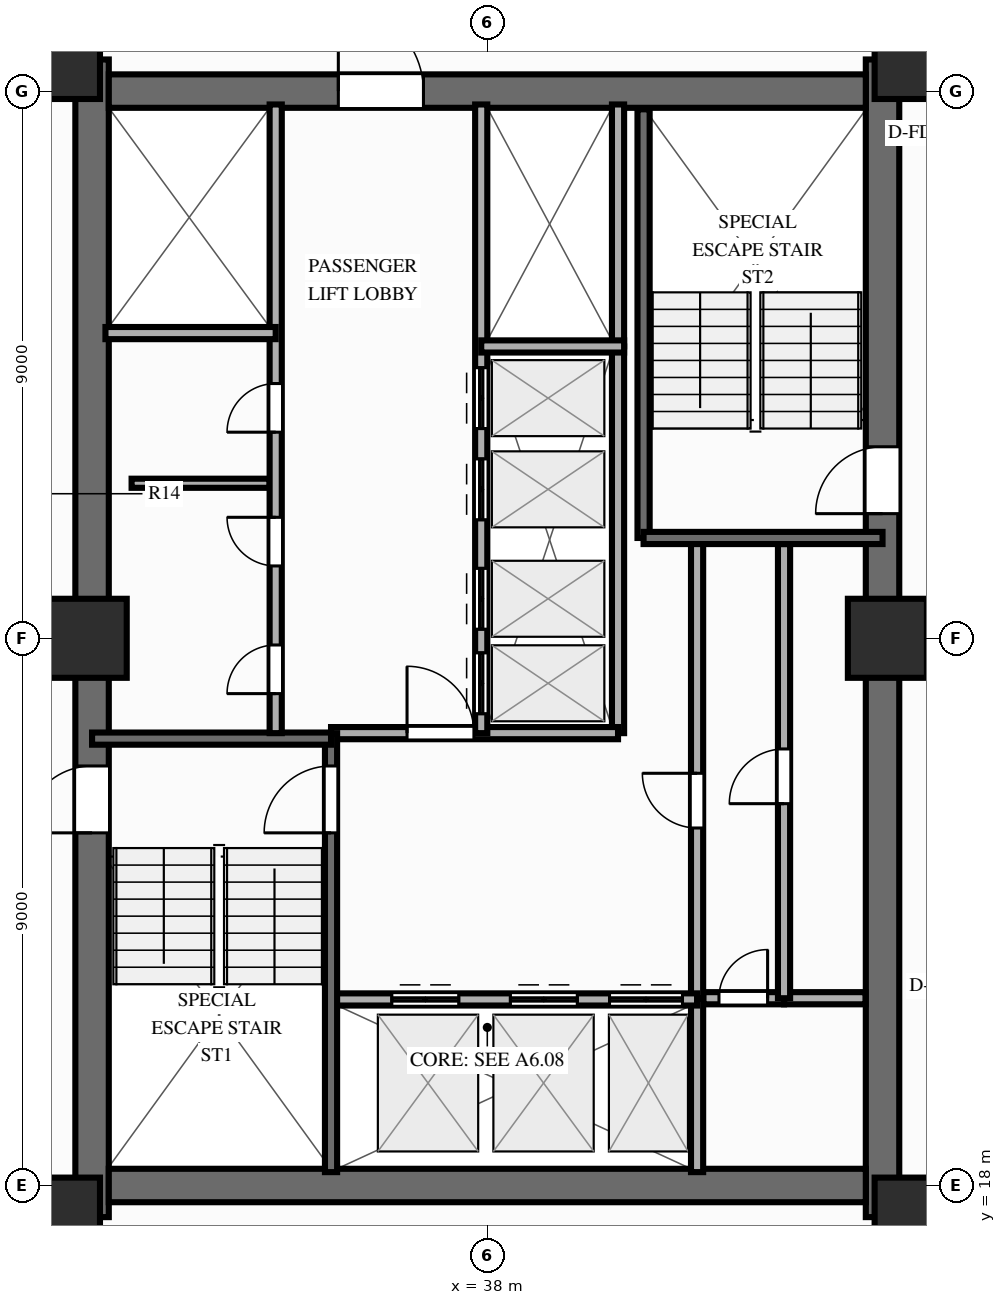
"""IFC4 building model, lengths in metres.
Left out: names, types, materials, properties, quantities, classifications, styles, units other than length and angle.
Written with IfcOpenShell. Run it as: python <this file> out.ifc"""

import sys

from ifc_helpers import new_model, si_unit, direction, frame, frame_2d, origin, origin_2d, place, context, subcontext, project, spatial, rectangle, extrude, source, transform, mapped, element, fill, save


model = new_model("IFC4")
c1 = context("Model", 3, precision=1e-05, world=origin(), true_north=direction((0.0, 1.0)))
c2 = subcontext(c1, "Body", "Model", "MODEL_VIEW")
j1 = project(units=[si_unit("LENGTHUNIT", "METRE"), si_unit("PLANEANGLEUNIT", "RADIAN")], contexts=[c1])
p1 = place(None, origin())
s1 = spatial("IfcSite", under=j1, at=p1, CompositionType="ELEMENT")
p2 = place(p1, origin())
s2 = spatial("IfcBuilding", under=s1, at=p2, CompositionType="ELEMENT")
p3 = place(p2, frame((0.0, 0.0, 126.75)))
s3 = spatial("IfcBuildingStorey", under=s2, at=p3, CompositionType="ELEMENT", Elevation=126.75)
p4 = place(p3, frame((31.5, 17.48, 0.0), z_axis=(0.0, 0.0, 1.0), x_axis=(0.0, 1.0, 0.0)))
e1 = element("IfcWall", 1, at=p4, inside=s3, PredefinedType="SHEAR", context=c2, shape_type="SweptSolid", body=[
    extrude(rectangle(XDim=19.04, YDim=0.55, at=frame_2d((9.52, 0.0))), origin(), (0.0, 0.0, 1.0), 3.0),
])
p5 = place(p4, frame((6.32, 0.0, 0.0)))
e2 = element("IfcOpeningElement", 2, at=p5, cuts=e1, PredefinedType="OPENING", context=c2, shape_type="SweptSolid", body=[
    extrude(rectangle(XDim=1.1, YDim=2.15, at=frame_2d((0.55, 1.075))), frame((0.0, 0.287, 0.0), z_axis=(0.0, -1.0, 0.0), x_axis=(1.0, 0.0, 0.0)), (0.0, 0.0, 1.0), 0.574),
])
p6 = place(p3, frame((44.5, 17.48, 0.0), z_axis=(0.0, 0.0, 1.0), x_axis=(0.0, 1.0, 0.0)))
e3 = element("IfcWall", 3, at=p6, inside=s3, PredefinedType="SHEAR", context=c2, shape_type="SweptSolid", body=[
    extrude(rectangle(XDim=19.04, YDim=0.55, at=frame_2d((9.52, 0.0))), origin(), (0.0, 0.0, 1.0), 3.0),
])
p7 = place(p6, frame((12.67, 0.0, 0.0), z_axis=(0.0, 0.0, 1.0), x_axis=(-1.0, 0.0, 0.0)))
e4 = element("IfcOpeningElement", 4, at=p7, cuts=e3, PredefinedType="OPENING", context=c2, shape_type="SweptSolid", body=[
    extrude(rectangle(XDim=1.1, YDim=2.15, at=frame_2d((0.55, 1.075))), frame((0.0, 0.287, 0.0), z_axis=(0.0, -1.0, 0.0), x_axis=(1.0, 0.0, 0.0)), (0.0, 0.0, 1.0), 0.574),
])
p8 = place(p3, frame((31.775, 18.0, 0.0), z_axis=(0.0, 0.0, 1.0), x_axis=(1.0, 0.0, 0.0)))
e5 = element("IfcWall", 5, at=p8, inside=s3, PredefinedType="SHEAR", context=c2, shape_type="SweptSolid", body=[
    extrude(rectangle(XDim=12.45, YDim=0.55, at=frame_2d((6.225, 0.0))), origin(), (0.0, 0.0, 1.0), 3.0),
])
p9 = place(p3, frame((31.775, 36.0, 0.0), z_axis=(0.0, 0.0, 1.0), x_axis=(1.0, 0.0, 0.0)))
e6 = element("IfcWall", 6, at=p9, inside=s3, PredefinedType="SHEAR", context=c2, shape_type="SweptSolid", body=[
    extrude(rectangle(XDim=12.45, YDim=0.55, at=frame_2d((6.225, 0.0))), origin(), (0.0, 0.0, 1.0), 3.0),
])
p10 = place(p9, frame((5.175, 0.0, 0.0), z_axis=(0.0, 0.0, 1.0), x_axis=(-1.0, 0.0, 0.0)))
e7 = element("IfcOpeningElement", 7, at=p10, cuts=e6, PredefinedType="OPENING", context=c2, shape_type="SweptSolid", body=[
    extrude(rectangle(XDim=1.4, YDim=2.15, at=frame_2d((0.7, 1.075))), frame((0.0, 0.287, 0.0), z_axis=(0.0, -1.0, 0.0), x_axis=(1.0, 0.0, 0.0)), (0.0, 0.0, 1.0), 0.574),
])
m1 = source(origin(), c2, "Body", "SweptSolid", [
    extrude(rectangle(XDim=1.3, YDim=1.3, at=origin_2d()), origin(), (0.0, 0.0, 1.0), 3.0),
])
for number, where, z_axis, x_axis in (
    (8, (30.98, 17.48, 0.0), (0.0, 0.0, 1.0), (1.0, 0.0, 0.0)),
    (9, (45.02, 17.48, 0.0), (0.0, 0.0, 1.0), (1.0, 0.0, 0.0)),
    (10, (30.98, 36.52, 0.0), (0.0, 0.0, 1.0), (1.0, 0.0, 0.0)),
    (11, (45.02, 36.52, 0.0), (0.0, 0.0, 1.0), (1.0, 0.0, 0.0)),
    (12, (31.42, 27.0, 0.0), (0.0, 0.0, 1.0), (1.0, 0.0, 0.0)),
    (13, (44.58, 27.0, 0.0), (0.0, 0.0, 1.0), (1.0, 0.0, 0.0)),
):
    element("IfcColumn", number, at=place(p3, frame(where, z_axis=z_axis, x_axis=x_axis)), inside=s3, PredefinedType="COLUMN", context=c2, shape_type="MappedRepresentation", body=[
        mapped(m1, transform((0.0, 0.0, 0.0), scale=1.0)),
    ])
p11 = place(p3, frame((32.15, 29.55, 0.0), z_axis=(0.0, 0.0, 1.0), x_axis=(1.0, 0.0, 0.0)))
e14 = element("IfcWall", 14, at=p11, inside=s3, PredefinedType="PARTITIONING", context=c2, shape_type="SweptSolid", body=[
    extrude(rectangle(XDim=2.27, YDim=0.15, at=frame_2d((1.135, 0.0))), origin(), (0.0, 0.0, 1.0), 2.79),
])
p12 = place(p3, frame((41.55, 21.08, 0.0), z_axis=(0.0, 0.0, 1.0), x_axis=(1.0, 0.0, 0.0)))
e15 = element("IfcWall", 15, at=p12, inside=s3, PredefinedType="PARTITIONING", context=c2, shape_type="SweptSolid", body=[
    extrude(rectangle(XDim=1.33, YDim=0.2, at=frame_2d((0.665, 0.0))), origin(), (0.0, 0.0, 1.0), 2.79),
])
p13 = place(p12, frame((0.26, 0.0, 0.0)))
e16 = element("IfcOpeningElement", 16, at=p13, cuts=e15, PredefinedType="OPENING", context=c2, shape_type="SweptSolid", body=[
    extrude(rectangle(XDim=0.8, YDim=2.05, at=frame_2d((0.4, 1.025))), frame((0.0, 0.112, 0.0), z_axis=(0.0, -1.0, 0.0), x_axis=(1.0, 0.0, 0.0)), (0.0, 0.0, 1.0), 0.224),
])
p14 = place(p3, frame((42.88, 21.08, 0.0), z_axis=(0.0, 0.0, 1.0), x_axis=(1.0, 0.0, 0.0)))
e17 = element("IfcWall", 17, at=p14, inside=s3, PredefinedType="PARTITIONING", context=c2, shape_type="SweptSolid", body=[
    extrude(rectangle(XDim=1.34, YDim=0.2, at=frame_2d((0.67, 0.0))), origin(), (0.0, 0.0, 1.0), 2.79),
])
p15 = place(p3, frame((42.88, 21.08, 0.0), z_axis=(0.0, 0.0, 1.0), x_axis=(0.0, 1.0, 0.0)))
e18 = element("IfcWall", 18, at=p15, inside=s3, PredefinedType="PARTITIONING", context=c2, shape_type="SweptSolid", body=[
    extrude(rectangle(XDim=7.47, YDim=0.2, at=frame_2d((3.735, 0.0))), origin(), (0.0, 0.0, 1.0), 2.79),
])
p16 = place(p15, frame((3.2, 0.0, 0.0)))
e19 = element("IfcOpeningElement", 19, at=p16, cuts=e18, PredefinedType="OPENING", context=c2, shape_type="SweptSolid", body=[
    extrude(rectangle(XDim=0.9, YDim=2.1, at=frame_2d((0.45, 1.05))), frame((0.0, 0.112, 0.0), z_axis=(0.0, -1.0, 0.0), x_axis=(1.0, 0.0, 0.0)), (0.0, 0.0, 1.0), 0.224),
])
p17 = place(p3, frame((41.45, 18.22, 0.0), z_axis=(0.0, 0.0, 1.0), x_axis=(0.0, 1.0, 0.0)))
e20 = element("IfcWall", 20, at=p17, inside=s3, PredefinedType="PARTITIONING", context=c2, shape_type="SweptSolid", body=[
    extrude(rectangle(XDim=2.86, YDim=0.2, at=frame_2d((1.43, 0.0))), origin(), (0.0, 0.0, 1.0), 2.79),
])
p18 = place(p3, frame((41.45, 21.08, 0.0), z_axis=(0.0, 0.0, 1.0), x_axis=(0.0, 1.0, 0.0)))
e21 = element("IfcWall", 21, at=p18, inside=s3, PredefinedType="PARTITIONING", context=c2, shape_type="SweptSolid", body=[
    extrude(rectangle(XDim=7.52, YDim=0.2, at=frame_2d((3.76, 0.0))), origin(), (0.0, 0.0, 1.0), 2.79),
])
p19 = place(p18, frame((2.8, 0.0, 0.0)))
e22 = element("IfcOpeningElement", 22, at=p19, cuts=e21, PredefinedType="OPENING", context=c2, shape_type="SweptSolid", body=[
    extrude(rectangle(XDim=0.9, YDim=2.1, at=frame_2d((0.45, 1.05))), frame((0.0, 0.112, 0.0), z_axis=(0.0, -1.0, 0.0), x_axis=(1.0, 0.0, 0.0)), (0.0, 0.0, 1.0), 0.224),
])
p20 = place(p3, frame((40.15, 25.44, 0.0), z_axis=(0.0, 0.0, 1.0), x_axis=(0.0, 1.0, 0.0)))
e23 = element("IfcWall", 23, at=p20, inside=s3, PredefinedType="PARTITIONING", context=c2, shape_type="SweptSolid", body=[
    extrude(rectangle(XDim=6.36, YDim=0.2, at=frame_2d((3.18, 0.0))), origin(), (0.0, 0.0, 1.0), 2.79),
])
p21 = place(p3, frame((40.15, 31.8, 0.0), z_axis=(0.0, 0.0, 1.0), x_axis=(0.0, 1.0, 0.0)))
e24 = element("IfcWall", 24, at=p21, inside=s3, PredefinedType="PARTITIONING", context=c2, shape_type="SweptSolid", body=[
    extrude(rectangle(XDim=3.98, YDim=0.2, at=frame_2d((1.99, 0.0))), origin(), (0.0, 0.0, 1.0), 2.79),
])
p22 = place(p3, frame((35.43, 21.06, 0.0), z_axis=(0.0, 0.0, 1.0), x_axis=(1.0, 0.0, 0.0)))
e25 = element("IfcWall", 25, at=p22, inside=s3, PredefinedType="PARTITIONING", context=c2, shape_type="SweptSolid", body=[
    extrude(rectangle(XDim=6.02, YDim=0.2, at=frame_2d((3.01, 0.0))), origin(), (0.0, 0.0, 1.0), 2.79),
])
p23 = place(p22, frame((1.0, 0.0, 0.0)))
e26 = element("IfcOpeningElement", 26, at=p23, cuts=e25, PredefinedType="OPENING", context=c2, shape_type="SweptSolid", body=[
    extrude(rectangle(XDim=1.1, YDim=2.15, at=frame_2d((0.55, 1.075))), frame((0.0, 0.112, 0.0), z_axis=(0.0, -1.0, 0.0), x_axis=(1.0, 0.0, 0.0)), (0.0, 0.0, 1.0), 0.224),
])
p24 = place(p22, frame((2.95, 0.0, 0.0)))
e27 = element("IfcOpeningElement", 27, at=p24, cuts=e25, PredefinedType="OPENING", context=c2, shape_type="SweptSolid", body=[
    extrude(rectangle(XDim=1.1, YDim=2.15, at=frame_2d((0.55, 1.075))), frame((0.0, 0.112, 0.0), z_axis=(0.0, -1.0, 0.0), x_axis=(1.0, 0.0, 0.0)), (0.0, 0.0, 1.0), 0.224),
])
p25 = place(p22, frame((4.58, 0.0, 0.0)))
e28 = element("IfcOpeningElement", 28, at=p25, cuts=e25, PredefinedType="OPENING", context=c2, shape_type="SweptSolid", body=[
    extrude(rectangle(XDim=1.2, YDim=2.15, at=frame_2d((0.6, 1.075))), frame((0.0, 0.112, 0.0), z_axis=(0.0, -1.0, 0.0), x_axis=(1.0, 0.0, 0.0)), (0.0, 0.0, 1.0), 0.224),
])
p26 = place(p3, frame((35.43, 25.44, 0.0), z_axis=(0.0, 0.0, 1.0), x_axis=(1.0, 0.0, 0.0)))
e29 = element("IfcWall", 29, at=p26, inside=s3, PredefinedType="PARTITIONING", context=c2, shape_type="SweptSolid", body=[
    extrude(rectangle(XDim=4.72, YDim=0.2, at=frame_2d((2.36, 0.0))), origin(), (0.0, 0.0, 1.0), 2.79),
])
p27 = place(p26, frame((1.25, 0.0, 0.0)))
e30 = element("IfcOpeningElement", 30, at=p27, cuts=e29, PredefinedType="OPENING", context=c2, shape_type="SweptSolid", body=[
    extrude(rectangle(XDim=1.1, YDim=2.15, at=frame_2d((0.55, 1.075))), frame((0.0, 0.112, 0.0), z_axis=(0.0, -1.0, 0.0), x_axis=(1.0, 0.0, 0.0)), (0.0, 0.0, 1.0), 0.224),
])
p28 = place(p3, frame((35.43, 18.22, 0.0), z_axis=(0.0, 0.0, 1.0), x_axis=(0.0, 1.0, 0.0)))
e31 = element("IfcWall", 31, at=p28, inside=s3, PredefinedType="SOLIDWALL", context=c2, shape_type="SweptSolid", body=[
    extrude(rectangle(XDim=7.22, YDim=0.2, at=frame_2d((3.61, 0.0))), origin(), (0.0, 0.0, 1.0), 2.79),
])
p29 = place(p28, frame((6.68, 0.0, 0.0), z_axis=(0.0, 0.0, 1.0), x_axis=(-1.0, 0.0, 0.0)))
e32 = element("IfcOpeningElement", 32, at=p29, cuts=e31, PredefinedType="OPENING", context=c2, shape_type="SweptSolid", body=[
    extrude(rectangle(XDim=1.1, YDim=2.15, at=frame_2d((0.55, 1.075))), frame((0.0, 0.112, 0.0), z_axis=(0.0, -1.0, 0.0), x_axis=(1.0, 0.0, 0.0)), (0.0, 0.0, 1.0), 0.224),
])
p30 = place(p3, frame((31.5, 25.35, 0.0), z_axis=(0.0, 0.0, 1.0), x_axis=(1.0, 0.0, 0.0)))
e33 = element("IfcWall", 33, at=p30, inside=s3, PredefinedType="SOLIDWALL", context=c2, shape_type="SweptSolid", body=[
    extrude(rectangle(XDim=3.93, YDim=0.2, at=frame_2d((1.965, 0.0))), origin(), (0.0, 0.0, 1.0), 2.79),
])
p31 = place(p3, frame((40.57, 28.65, 0.0), z_axis=(0.0, 0.0, 1.0), x_axis=(0.0, 1.0, 0.0)))
e34 = element("IfcWall", 34, at=p31, inside=s3, PredefinedType="SOLIDWALL", context=c2, shape_type="SweptSolid", body=[
    extrude(rectangle(XDim=7.05, YDim=0.2, at=frame_2d((3.525, 0.0))), origin(), (0.0, 0.0, 1.0), 2.79),
])
p32 = place(p3, frame((40.57, 28.65, 0.0), z_axis=(0.0, 0.0, 1.0), x_axis=(1.0, 0.0, 0.0)))
e35 = element("IfcWall", 35, at=p32, inside=s3, PredefinedType="SOLIDWALL", context=c2, shape_type="SweptSolid", body=[
    extrude(rectangle(XDim=3.93, YDim=0.2, at=frame_2d((1.965, 0.0))), origin(), (0.0, 0.0, 1.0), 2.79),
])
p33 = place(p3, frame((34.52, 25.44, 0.0), z_axis=(0.0, 0.0, 1.0), x_axis=(0.0, 1.0, 0.0)))
e36 = element("IfcWall", 36, at=p33, inside=s3, PredefinedType="PARTITIONING", context=c2, shape_type="SweptSolid", body=[
    extrude(rectangle(XDim=10.34, YDim=0.2, at=frame_2d((5.17, 0.0))), origin(), (0.0, 0.0, 1.0), 2.79),
])
p34 = place(p33, frame((0.65, 0.0, 0.0)))
e37 = element("IfcOpeningElement", 37, at=p34, cuts=e36, PredefinedType="OPENING", context=c2, shape_type="SweptSolid", body=[
    extrude(rectangle(XDim=0.8, YDim=2.05, at=frame_2d((0.4, 1.025))), frame((0.0, 0.112, 0.0), z_axis=(0.0, -1.0, 0.0), x_axis=(1.0, 0.0, 0.0)), (0.0, 0.0, 1.0), 0.224),
])
p35 = place(p33, frame((2.75, 0.0, 0.0)))
e38 = element("IfcOpeningElement", 38, at=p35, cuts=e36, PredefinedType="OPENING", context=c2, shape_type="SweptSolid", body=[
    extrude(rectangle(XDim=0.8, YDim=2.05, at=frame_2d((0.4, 1.025))), frame((0.0, 0.112, 0.0), z_axis=(0.0, -1.0, 0.0), x_axis=(1.0, 0.0, 0.0)), (0.0, 0.0, 1.0), 0.224),
])
p36 = place(p33, frame((4.95, 0.0, 0.0)))
e39 = element("IfcOpeningElement", 39, at=p36, cuts=e36, PredefinedType="OPENING", context=c2, shape_type="SweptSolid", body=[
    extrude(rectangle(XDim=0.8, YDim=2.05, at=frame_2d((0.4, 1.025))), frame((0.0, 0.112, 0.0), z_axis=(0.0, -1.0, 0.0), x_axis=(1.0, 0.0, 0.0)), (0.0, 0.0, 1.0), 0.224),
])
p37 = place(p3, frame((31.72, 32.02, 0.0), z_axis=(0.0, 0.0, 1.0), x_axis=(1.0, 0.0, 0.0)))
e40 = element("IfcWall", 40, at=p37, inside=s3, PredefinedType="PARTITIONING", context=c2, shape_type="SweptSolid", body=[
    extrude(rectangle(XDim=2.8, YDim=0.2, at=frame_2d((1.4, 0.0))), origin(), (0.0, 0.0, 1.0), 2.79),
])
p38 = place(p3, frame((37.9, 25.44, 0.0), z_axis=(0.0, 0.0, 1.0), x_axis=(0.0, 1.0, 0.0)))
e41 = element("IfcWall", 41, at=p38, inside=s3, PredefinedType="PARTITIONING", context=c2, shape_type="SweptSolid", body=[
    extrude(rectangle(XDim=10.34, YDim=0.2, at=frame_2d((5.17, 0.0))), origin(), (0.0, 0.0, 1.0), 2.79),
])
p39 = place(p38, frame((0.32, 0.0, 0.0)))
e42 = element("IfcOpeningElement", 42, at=p39, cuts=e41, PredefinedType="OPENING", context=c2, shape_type="SweptSolid", body=[
    extrude(rectangle(XDim=1.0, YDim=2.15, at=frame_2d((0.5, 1.075))), frame((0.0, 0.112, 0.0), z_axis=(0.0, -1.0, 0.0), x_axis=(1.0, 0.0, 0.0)), (0.0, 0.0, 1.0), 0.224),
])
p40 = place(p38, frame((1.71, 0.0, 0.0)))
e43 = element("IfcOpeningElement", 43, at=p40, cuts=e41, PredefinedType="OPENING", context=c2, shape_type="SweptSolid", body=[
    extrude(rectangle(XDim=1.0, YDim=2.15, at=frame_2d((0.5, 1.075))), frame((0.0, 0.112, 0.0), z_axis=(0.0, -1.0, 0.0), x_axis=(1.0, 0.0, 0.0)), (0.0, 0.0, 1.0), 0.224),
])
p41 = place(p38, frame((3.51, 0.0, 0.0)))
e44 = element("IfcOpeningElement", 44, at=p41, cuts=e41, PredefinedType="OPENING", context=c2, shape_type="SweptSolid", body=[
    extrude(rectangle(XDim=1.0, YDim=2.15, at=frame_2d((0.5, 1.075))), frame((0.0, 0.112, 0.0), z_axis=(0.0, -1.0, 0.0), x_axis=(1.0, 0.0, 0.0)), (0.0, 0.0, 1.0), 0.224),
])
p42 = place(p38, frame((5.01, 0.0, 0.0)))
e45 = element("IfcOpeningElement", 45, at=p42, cuts=e41, PredefinedType="OPENING", context=c2, shape_type="SweptSolid", body=[
    extrude(rectangle(XDim=1.0, YDim=2.15, at=frame_2d((0.5, 1.075))), frame((0.0, 0.112, 0.0), z_axis=(0.0, -1.0, 0.0), x_axis=(1.0, 0.0, 0.0)), (0.0, 0.0, 1.0), 0.224),
])
p43 = place(p3, frame((37.9, 31.8, 0.0), z_axis=(0.0, 0.0, 1.0), x_axis=(1.0, 0.0, 0.0)))
e46 = element("IfcWall", 46, at=p43, inside=s3, PredefinedType="PARTITIONING", context=c2, shape_type="SweptSolid", body=[
    extrude(rectangle(XDim=2.35, YDim=0.2, at=frame_2d((1.175, 0.0))), origin(), (0.0, 0.0, 1.0), 2.79),
])
m2 = source(origin(), c2, "Body", "SweptSolid", [
    extrude(rectangle(XDim=1.1, YDim=2.15, at=frame_2d((0.55, 1.075))), frame((0.0, 0.025, 0.0), z_axis=(0.0, -1.0, 0.0), x_axis=(1.0, 0.0, 0.0)), (0.0, 0.0, 1.0), 0.05),
])
p44 = place(p5, origin())
e47 = element("IfcDoor", 47, at=p44, inside=s3, OperationType="SINGLE_SWING_LEFT", PredefinedType="DOOR", context=c2, shape_type="MappedRepresentation", body=[
    mapped(m2, transform((0.0, 0.0, 0.0), scale=1.0)),
])
fill(e2, e47)
p45 = place(p7, origin())
e48 = element("IfcDoor", 48, at=p45, inside=s3, OperationType="SINGLE_SWING_RIGHT", PredefinedType="DOOR", context=c2, shape_type="MappedRepresentation", body=[
    mapped(m2, transform((0.0, 0.0, 0.0), scale=1.0)),
])
fill(e4, e48)
m3 = source(origin(), c2, "Body", "SweptSolid", [
    extrude(rectangle(XDim=1.4, YDim=2.15, at=frame_2d((0.7, 1.075))), frame((0.0, 0.025, 0.0), z_axis=(0.0, -1.0, 0.0), x_axis=(1.0, 0.0, 0.0)), (0.0, 0.0, 1.0), 0.05),
])
p46 = place(p10, origin())
e49 = element("IfcDoor", 49, at=p46, inside=s3, OperationType="SINGLE_SWING_RIGHT", PredefinedType="DOOR", context=c2, shape_type="MappedRepresentation", body=[
    mapped(m3, transform((0.0, 0.0, 0.0), scale=1.0)),
])
fill(e7, e49)
m4 = source(origin(), c2, "Body", "SweptSolid", [
    extrude(rectangle(XDim=0.8, YDim=2.05, at=frame_2d((0.4, 1.025))), frame((0.0, 0.025, 0.0), z_axis=(0.0, -1.0, 0.0), x_axis=(1.0, 0.0, 0.0)), (0.0, 0.0, 1.0), 0.05),
])
p47 = place(p13, origin())
e50 = element("IfcDoor", 50, at=p47, inside=s3, OperationType="SINGLE_SWING_RIGHT", PredefinedType="DOOR", context=c2, shape_type="MappedRepresentation", body=[
    mapped(m4, transform((0.0, 0.0, 0.0), scale=1.0)),
])
fill(e16, e50)
m5 = source(origin(), c2, "Body", "SweptSolid", [
    extrude(rectangle(XDim=0.9, YDim=2.1, at=frame_2d((0.45, 1.05))), frame((0.0, 0.025, 0.0), z_axis=(0.0, -1.0, 0.0), x_axis=(1.0, 0.0, 0.0)), (0.0, 0.0, 1.0), 0.05),
])
p48 = place(p16, origin())
e51 = element("IfcDoor", 51, at=p48, inside=s3, OperationType="SINGLE_SWING_LEFT", PredefinedType="DOOR", context=c2, shape_type="MappedRepresentation", body=[
    mapped(m5, transform((0.0, 0.0, 0.0), scale=1.0)),
])
fill(e19, e51)
p49 = place(p19, origin())
e52 = element("IfcDoor", 52, at=p49, inside=s3, OperationType="SINGLE_SWING_RIGHT", PredefinedType="DOOR", context=c2, shape_type="MappedRepresentation", body=[
    mapped(m5, transform((0.0, 0.0, 0.0), scale=1.0)),
])
fill(e22, e52)
p50 = place(p23, origin())
e53 = element("IfcDoor", 53, at=p50, inside=s3, OperationType="DOUBLE_DOOR_SLIDING", PredefinedType="DOOR", context=c2, shape_type="MappedRepresentation", body=[
    mapped(m2, transform((0.0, 0.0, 0.0), scale=1.0)),
])
fill(e26, e53)
p51 = place(p24, origin())
e54 = element("IfcDoor", 54, at=p51, inside=s3, OperationType="DOUBLE_DOOR_SLIDING", PredefinedType="DOOR", context=c2, shape_type="MappedRepresentation", body=[
    mapped(m2, transform((0.0, 0.0, 0.0), scale=1.0)),
])
fill(e27, e54)
m6 = source(origin(), c2, "Body", "SweptSolid", [
    extrude(rectangle(XDim=1.2, YDim=2.15, at=frame_2d((0.6, 1.075))), frame((0.0, 0.025, 0.0), z_axis=(0.0, -1.0, 0.0), x_axis=(1.0, 0.0, 0.0)), (0.0, 0.0, 1.0), 0.05),
])
p52 = place(p25, origin())
e55 = element("IfcDoor", 55, at=p52, inside=s3, OperationType="DOUBLE_DOOR_SLIDING", PredefinedType="DOOR", context=c2, shape_type="MappedRepresentation", body=[
    mapped(m6, transform((0.0, 0.0, 0.0), scale=1.0)),
])
fill(e28, e55)
p53 = place(p27, origin())
e56 = element("IfcDoor", 56, at=p53, inside=s3, OperationType="SINGLE_SWING_LEFT", PredefinedType="DOOR", context=c2, shape_type="MappedRepresentation", body=[
    mapped(m2, transform((0.0, 0.0, 0.0), scale=1.0)),
])
fill(e30, e56)
p54 = place(p29, origin())
e57 = element("IfcDoor", 57, at=p54, inside=s3, OperationType="SINGLE_SWING_RIGHT", PredefinedType="DOOR", context=c2, shape_type="MappedRepresentation", body=[
    mapped(m2, transform((0.0, 0.0, 0.0), scale=1.0)),
])
fill(e32, e57)
p55 = place(p34, origin())
e58 = element("IfcDoor", 58, at=p55, inside=s3, OperationType="SINGLE_SWING_LEFT", PredefinedType="DOOR", context=c2, shape_type="MappedRepresentation", body=[
    mapped(m4, transform((0.0, 0.0, 0.0), scale=1.0)),
])
fill(e37, e58)
p56 = place(p35, origin())
e59 = element("IfcDoor", 59, at=p56, inside=s3, OperationType="SINGLE_SWING_RIGHT", PredefinedType="DOOR", context=c2, shape_type="MappedRepresentation", body=[
    mapped(m4, transform((0.0, 0.0, 0.0), scale=1.0)),
])
fill(e38, e59)
p57 = place(p36, origin())
e60 = element("IfcDoor", 60, at=p57, inside=s3, OperationType="SINGLE_SWING_LEFT", PredefinedType="DOOR", context=c2, shape_type="MappedRepresentation", body=[
    mapped(m4, transform((0.0, 0.0, 0.0), scale=1.0)),
])
fill(e39, e60)
m7 = source(origin(), c2, "Body", "SweptSolid", [
    extrude(rectangle(XDim=1.0, YDim=2.15, at=frame_2d((0.5, 1.075))), frame((0.0, 0.025, 0.0), z_axis=(0.0, -1.0, 0.0), x_axis=(1.0, 0.0, 0.0)), (0.0, 0.0, 1.0), 0.05),
])
p58 = place(p39, origin())
e61 = element("IfcDoor", 61, at=p58, inside=s3, OperationType="DOUBLE_DOOR_SLIDING", PredefinedType="DOOR", context=c2, shape_type="MappedRepresentation", body=[
    mapped(m7, transform((0.0, 0.0, 0.0), scale=1.0)),
])
fill(e42, e61)
p59 = place(p40, origin())
e62 = element("IfcDoor", 62, at=p59, inside=s3, OperationType="DOUBLE_DOOR_SLIDING", PredefinedType="DOOR", context=c2, shape_type="MappedRepresentation", body=[
    mapped(m7, transform((0.0, 0.0, 0.0), scale=1.0)),
])
fill(e43, e62)
p60 = place(p41, origin())
e63 = element("IfcDoor", 63, at=p60, inside=s3, OperationType="DOUBLE_DOOR_SLIDING", PredefinedType="DOOR", context=c2, shape_type="MappedRepresentation", body=[
    mapped(m7, transform((0.0, 0.0, 0.0), scale=1.0)),
])
fill(e44, e63)
p61 = place(p42, origin())
e64 = element("IfcDoor", 64, at=p61, inside=s3, OperationType="DOUBLE_DOOR_SLIDING", PredefinedType="DOOR", context=c2, shape_type="MappedRepresentation", body=[
    mapped(m7, transform((0.0, 0.0, 0.0), scale=1.0)),
])
fill(e45, e64)
save(model, sys.argv[1])
